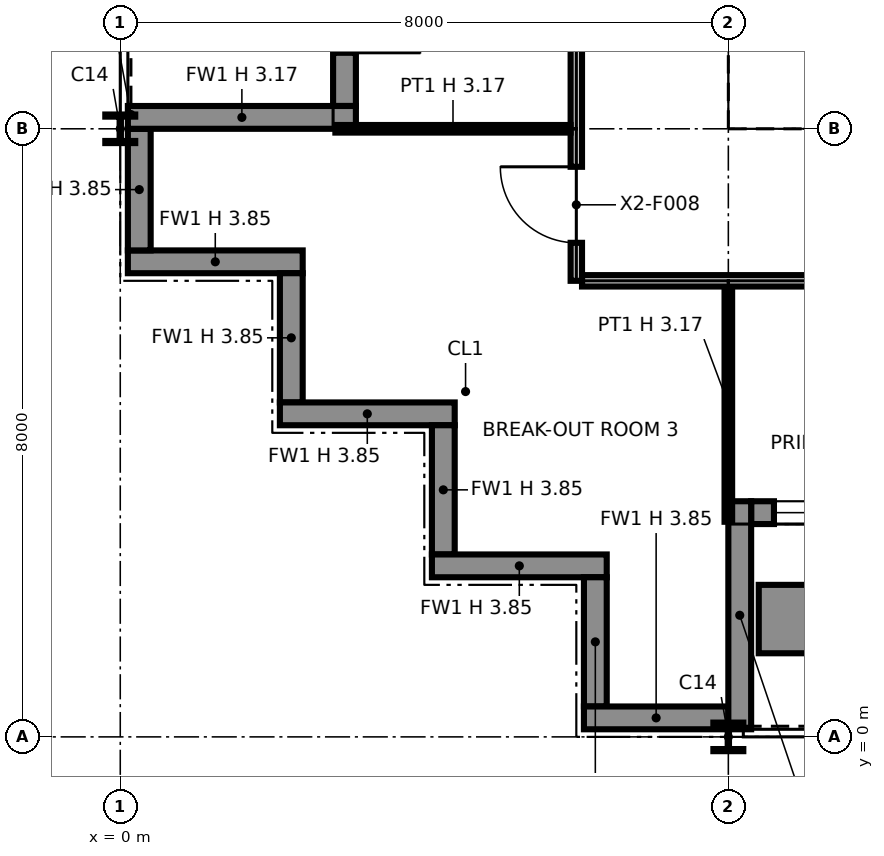
"""IFC4 building model, lengths in metres.
Left out: names, types, materials, properties, quantities, classifications, styles, units other than length and angle.
Written with IfcOpenShell. Run it as: python <this file> out.ifc"""

import sys

from ifc_helpers import new_model, si_unit, direction, frame, frame_2d, origin, origin_2d, place, context, subcontext, project, spatial, polyline, rectangle, i_section, outline, extrude, element, fill, save


model = new_model("IFC4")
c1 = context("Model", 3, precision=1e-05, world=origin(), true_north=direction((0.0, 1.0)))
c2 = subcontext(c1, "Body", "Model", "MODEL_VIEW")
j1 = project(units=[si_unit("LENGTHUNIT", "METRE"), si_unit("PLANEANGLEUNIT", "RADIAN")], contexts=[c1])
p1 = place(None, origin())
s1 = spatial("IfcSite", under=j1, at=p1, CompositionType="ELEMENT")
p2 = place(p1, origin())
s2 = spatial("IfcBuilding", under=s1, at=p2, CompositionType="ELEMENT")
p3 = place(p2, frame((0.0, 0.0, 259.0)))
s3 = spatial("IfcBuildingStorey", under=s2, at=p3, CompositionType="ELEMENT", Elevation=259.0)
for number, where, z_axis, x_axis in (
    (1, (0.0, 8.0, 0.0), (0.0, 0.0, 1.0), (1.0, 0.0, 0.0)),
    (2, (8.0, 0.0, 0.0), (0.0, 0.0, 1.0), (1.0, 0.0, 0.0)),
):
    element("IfcColumn", number, at=place(p3, frame(where, z_axis=z_axis, x_axis=x_axis)), inside=s3, PredefinedType="COLUMN", context=c2, shape_type="SweptSolid", body=[
        extrude(i_section(OverallWidth=0.394, OverallDepth=0.376, WebThickness=0.017, FlangeThickness=0.028, at=origin_2d()), origin(), (0.0, 0.0, 1.0), 3.85),
    ])
p4 = place(p3, frame((8.0, 8.0, 0.0), z_axis=(0.0, 0.0, 1.0), x_axis=(1.0, 0.0, 0.0)))
e3 = element("IfcColumn", 3, at=p4, inside=s3, PredefinedType="COLUMN", context=c2, shape_type="SweptSolid", body=[
    extrude(i_section(OverallWidth=0.371, OverallDepth=0.361, WebThickness=0.012, FlangeThickness=0.02, at=origin_2d()), origin(), (0.0, 0.0, 1.0), 3.85),
])
p5 = place(p3, frame((0.1, 6.25, 0.0), z_axis=(0.0, 0.0, 1.0), x_axis=(1.0, 0.0, 0.0)))
e4 = element("IfcWall", 4, at=p5, inside=s3, PredefinedType="SOLIDWALL", context=c2, shape_type="SweptSolid", body=[
    extrude(rectangle(XDim=2.3, YDim=0.3, at=frame_2d((1.15, 0.0))), origin(), (0.0, 0.0, 1.0), 3.85),
])
p6 = place(p3, frame((2.25, 6.1, 0.0), z_axis=(0.0, 0.0, 1.0), x_axis=(0.0, -1.0, 0.0)))
e5 = element("IfcWall", 5, at=p6, inside=s3, PredefinedType="SOLIDWALL", context=c2, shape_type="SweptSolid", body=[
    extrude(rectangle(XDim=1.7, YDim=0.3, at=frame_2d((0.85, 0.0))), origin(), (0.0, 0.0, 1.0), 3.85),
])
p7 = place(p3, frame((2.1, 4.25, 0.0), z_axis=(0.0, 0.0, 1.0), x_axis=(1.0, 0.0, 0.0)))
e6 = element("IfcWall", 6, at=p7, inside=s3, PredefinedType="SOLIDWALL", context=c2, shape_type="SweptSolid", body=[
    extrude(rectangle(XDim=2.3, YDim=0.3, at=frame_2d((1.15, 0.0))), origin(), (0.0, 0.0, 1.0), 3.85),
])
p8 = place(p3, frame((4.25, 4.1, 0.0), z_axis=(0.0, 0.0, 1.0), x_axis=(0.0, -1.0, 0.0)))
e7 = element("IfcWall", 7, at=p8, inside=s3, PredefinedType="SOLIDWALL", context=c2, shape_type="SweptSolid", body=[
    extrude(rectangle(XDim=1.7, YDim=0.3, at=frame_2d((0.85, 0.0))), origin(), (0.0, 0.0, 1.0), 3.85),
])
p9 = place(p3, frame((4.1, 2.25, 0.0), z_axis=(0.0, 0.0, 1.0), x_axis=(1.0, 0.0, 0.0)))
e8 = element("IfcWall", 8, at=p9, inside=s3, PredefinedType="SOLIDWALL", context=c2, shape_type="SweptSolid", body=[
    extrude(rectangle(XDim=2.3, YDim=0.3, at=frame_2d((1.15, 0.0))), origin(), (0.0, 0.0, 1.0), 3.85),
])
p10 = place(p3, frame((6.25, 2.1, 0.0), z_axis=(0.0, 0.0, 1.0), x_axis=(0.0, -1.0, 0.0)))
e9 = element("IfcWall", 9, at=p10, inside=s3, PredefinedType="SOLIDWALL", context=c2, shape_type="SweptSolid", body=[
    extrude(rectangle(XDim=1.7, YDim=0.3, at=frame_2d((0.85, 0.0))), origin(), (0.0, 0.0, 1.0), 3.85),
])
p11 = place(p3, frame((6.1, 0.25, 0.0), z_axis=(0.0, 0.0, 1.0), x_axis=(1.0, 0.0, 0.0)))
e10 = element("IfcWall", 10, at=p11, inside=s3, PredefinedType="SOLIDWALL", context=c2, shape_type="SweptSolid", body=[
    extrude(rectangle(XDim=1.9, YDim=0.3, at=frame_2d((0.95, 0.0))), origin(), (0.0, 0.0, 1.0), 3.85),
])
p12 = place(p3, frame((8.3, 2.95, 0.0), z_axis=(0.0, 0.0, 1.0), x_axis=(1.0, 0.0, 0.0)))
e11 = element("IfcWall", 11, at=p12, inside=s3, PredefinedType="SOLIDWALL", context=c2, shape_type="SweptSolid", body=[
    extrude(rectangle(XDim=7.4, YDim=0.3, at=frame_2d((3.7, 0.0))), origin(), (0.0, 0.0, 1.0), 3.85),
])
p13 = place(p12, frame((0.3, 0.0, 0.9)))
e12 = element("IfcOpeningElement", 12, at=p13, cuts=e11, PredefinedType="OPENING", context=c2, shape_type="SweptSolid", body=[
    extrude(rectangle(XDim=2.8, YDim=2.2, at=frame_2d((1.4, 1.1))), frame((0.0, 0.16, 0.0), z_axis=(0.0, -1.0, 0.0), x_axis=(1.0, 0.0, 0.0)), (0.0, 0.0, 1.0), 0.32),
])
p14 = place(p12, frame((4.7, 0.0, 0.0)))
e13 = element("IfcOpeningElement", 13, at=p14, cuts=e11, PredefinedType="OPENING", context=c2, shape_type="SweptSolid", body=[
    extrude(rectangle(XDim=2.0, YDim=2.4, at=frame_2d((1.0, 1.2))), frame((0.0, 0.16, 0.0), z_axis=(0.0, -1.0, 0.0), x_axis=(1.0, 0.0, 0.0)), (0.0, 0.0, 1.0), 0.32),
])
p15 = place(p3, frame((8.15, 0.1, 0.0), z_axis=(0.0, 0.0, 1.0), x_axis=(0.0, 1.0, 0.0)))
e14 = element("IfcWall", 14, at=p15, inside=s3, PredefinedType="SOLIDWALL", context=c2, shape_type="SweptSolid", body=[
    extrude(rectangle(XDim=3.0, YDim=0.3, at=frame_2d((1.5, 0.0))), origin(), (0.0, 0.0, 1.0), 3.171),
])
p16 = place(p3, frame((8.4, 1.55, 0.0), z_axis=(0.0, 0.0, 1.0), x_axis=(1.0, 0.0, 0.0)))
e15 = element("IfcWall", 15, at=p16, inside=s3, PredefinedType="SOLIDWALL", context=c2, shape_type="SweptSolid", body=[
    extrude(rectangle(XDim=3.2, YDim=0.9, at=frame_2d((1.6, 0.0))), origin(), (0.0, 0.0, 1.0), 0.6),
])
p17 = place(p3, frame((2.95, 15.7, 0.0), z_axis=(0.0, 0.0, 1.0), x_axis=(0.0, -1.0, 0.0)))
e16 = element("IfcWall", 16, at=p17, inside=s3, PredefinedType="SOLIDWALL", context=c2, shape_type="SweptSolid", body=[
    extrude(rectangle(XDim=7.4, YDim=0.3, at=frame_2d((3.7, 0.0))), origin(), (0.0, 0.0, 1.0), 3.85),
])
p18 = place(p17, frame((0.3, 0.0, 0.9)))
e17 = element("IfcOpeningElement", 17, at=p18, cuts=e16, PredefinedType="OPENING", context=c2, shape_type="SweptSolid", body=[
    extrude(rectangle(XDim=2.8, YDim=2.2, at=frame_2d((1.4, 1.1))), frame((0.0, 0.16, 0.0), z_axis=(0.0, -1.0, 0.0), x_axis=(1.0, 0.0, 0.0)), (0.0, 0.0, 1.0), 0.32),
])
p19 = place(p17, frame((4.7, 0.0, 0.0)))
e18 = element("IfcOpeningElement", 18, at=p19, cuts=e16, PredefinedType="OPENING", context=c2, shape_type="SweptSolid", body=[
    extrude(rectangle(XDim=2.0, YDim=2.4, at=frame_2d((1.0, 1.2))), frame((0.0, 0.16, 0.0), z_axis=(0.0, -1.0, 0.0), x_axis=(1.0, 0.0, 0.0)), (0.0, 0.0, 1.0), 0.32),
])
p20 = place(p3, frame((0.1, 8.15, 0.0), z_axis=(0.0, 0.0, 1.0), x_axis=(1.0, 0.0, 0.0)))
e19 = element("IfcWall", 19, at=p20, inside=s3, PredefinedType="SOLIDWALL", context=c2, shape_type="SweptSolid", body=[
    extrude(rectangle(XDim=3.0, YDim=0.3, at=frame_2d((1.5, 0.0))), origin(), (0.0, 0.0, 1.0), 3.171),
])
p21 = place(p3, frame((0.25, 8.0, 0.0), z_axis=(0.0, 0.0, 1.0), x_axis=(0.0, -1.0, 0.0)))
e20 = element("IfcWall", 20, at=p21, inside=s3, PredefinedType="SOLIDWALL", context=c2, shape_type="SweptSolid", body=[
    extrude(rectangle(XDim=1.6, YDim=0.3, at=frame_2d((0.8, 0.0))), origin(), (0.0, 0.0, 1.0), 3.85),
])
p22 = place(p3, frame((8.65, 8.75, 0.0), z_axis=(0.0, 0.0, 1.0), x_axis=(1.0, 0.0, 0.0)))
e21 = element("IfcWall", 21, at=p22, inside=s3, PredefinedType="PARTITIONING", context=c2, shape_type="SweptSolid", body=[
    extrude(outline(polyline([(0.0, 0.0), (14.7, 0.0), (14.7, 3.85), (7.438, 3.85), (7.438, 3.308), (7.262, 3.308), (7.261, 3.85), (0.0, 3.85), (0.0, 0.0)])), frame((0.0, 0.1, 0.0), z_axis=(0.0, -1.0, 0.0), x_axis=(1.0, 0.0, 0.0)), (0.0, 0.0, 1.0), 0.2),
])
p23 = place(p22, frame((1.3, 0.0, 0.0)))
e22 = element("IfcOpeningElement", 22, at=p23, cuts=e21, PredefinedType="OPENING", context=c2, shape_type="SweptSolid", body=[
    extrude(rectangle(XDim=1.4, YDim=2.1, at=frame_2d((0.7, 1.05))), frame((0.0, 0.11, 0.0), z_axis=(0.0, -1.0, 0.0), x_axis=(1.0, 0.0, 0.0)), (0.0, 0.0, 1.0), 0.22),
])
p24 = place(p22, frame((4.6, 0.0, 0.0)))
e23 = element("IfcOpeningElement", 23, at=p24, cuts=e21, PredefinedType="OPENING", context=c2, shape_type="SweptSolid", body=[
    extrude(rectangle(XDim=1.4, YDim=2.1, at=frame_2d((0.7, 1.05))), frame((0.0, 0.11, 0.0), z_axis=(0.0, -1.0, 0.0), x_axis=(1.0, 0.0, 0.0)), (0.0, 0.0, 1.0), 0.22),
])
p25 = place(p22, frame((10.4, 0.0, 0.0)))
e24 = element("IfcOpeningElement", 24, at=p25, cuts=e21, PredefinedType="OPENING", context=c2, shape_type="SweptSolid", body=[
    extrude(rectangle(XDim=1.2, YDim=2.1, at=frame_2d((0.6, 1.05))), frame((0.0, 0.11, 0.0), z_axis=(0.0, -1.0, 0.0), x_axis=(1.0, 0.0, 0.0)), (0.0, 0.0, 1.0), 0.22),
])
p26 = place(p3, frame((8.75, 8.85, 0.0), z_axis=(0.0, 0.0, 1.0), x_axis=(0.0, 1.0, 0.0)))
e25 = element("IfcWall", 25, at=p26, inside=s3, PredefinedType="PARTITIONING", context=c2, shape_type="SweptSolid", body=[
    extrude(outline(polyline([(0.0, 0.0), (14.3, 0.0), (14.3, 3.85), (10.225, 3.85), (10.224, 3.44), (10.076, 3.44), (10.075, 3.85), (7.239, 3.85), (7.238, 3.308), (7.062, 3.308), (7.062, 3.85), (0.0, 3.85), (0.0, 0.0)])), frame((0.0, 0.1, 0.0), z_axis=(0.0, -1.0, 0.0), x_axis=(1.0, 0.0, 0.0)), (0.0, 0.0, 1.0), 0.2),
])
p27 = place(p26, frame((8.3, 0.0, 0.0)))
e26 = element("IfcOpeningElement", 26, at=p27, cuts=e25, PredefinedType="OPENING", context=c2, shape_type="SweptSolid", body=[
    extrude(rectangle(XDim=1.8, YDim=2.1, at=frame_2d((0.9, 1.05))), frame((0.0, 0.11, 0.0), z_axis=(0.0, -1.0, 0.0), x_axis=(1.0, 0.0, 0.0)), (0.0, 0.0, 1.0), 0.22),
])
p28 = place(p3, frame((8.0, 2.83, 0.0), z_axis=(0.0, 0.0, 1.0), x_axis=(0.0, 1.0, 0.0)))
e27 = element("IfcWall", 27, at=p28, inside=s3, PredefinedType="PARTITIONING", context=c2, shape_type="SweptSolid", body=[
    extrude(rectangle(XDim=3.095, YDim=0.1, at=frame_2d((1.547, 0.0))), origin(), (0.0, 0.0, 1.0), 3.172),
])
p29 = place(p3, frame((6.075, 6.0, 0.0), z_axis=(0.0, 0.0, 1.0), x_axis=(1.0, 0.0, 0.0)))
e28 = element("IfcWall", 28, at=p29, inside=s3, PredefinedType="PARTITIONING", context=c2, shape_type="SweptSolid", body=[
    extrude(rectangle(XDim=35.85, YDim=0.15, at=frame_2d((17.925, 0.0))), origin(), (0.0, 0.0, 1.0), 3.85),
])
p30 = place(p29, frame((14.425, 0.0, 0.0), z_axis=(0.0, 0.0, 1.0), x_axis=(-1.0, 0.0, 0.0)))
e29 = element("IfcOpeningElement", 29, at=p30, cuts=e28, PredefinedType="OPENING", context=c2, shape_type="SweptSolid", body=[
    extrude(rectangle(XDim=1.0, YDim=2.1, at=frame_2d((0.5, 1.05))), frame((0.0, 0.085, 0.0), z_axis=(0.0, -1.0, 0.0), x_axis=(1.0, 0.0, 0.0)), (0.0, 0.0, 1.0), 0.17),
])
p31 = place(p29, frame((30.425, 0.0, 0.0), z_axis=(0.0, 0.0, 1.0), x_axis=(-1.0, 0.0, 0.0)))
e30 = element("IfcOpeningElement", 30, at=p31, cuts=e28, PredefinedType="OPENING", context=c2, shape_type="SweptSolid", body=[
    extrude(rectangle(XDim=1.0, YDim=2.1, at=frame_2d((0.5, 1.05))), frame((0.0, 0.085, 0.0), z_axis=(0.0, -1.0, 0.0), x_axis=(1.0, 0.0, 0.0)), (0.0, 0.0, 1.0), 0.17),
])
p32 = place(p29, frame((4.425, 0.0, 0.0), z_axis=(0.0, 0.0, 1.0), x_axis=(-1.0, 0.0, 0.0)))
e31 = element("IfcOpeningElement", 31, at=p32, cuts=e28, PredefinedType="OPENING", context=c2, shape_type="SweptSolid", body=[
    extrude(rectangle(XDim=1.0, YDim=2.1, at=frame_2d((0.5, 1.05))), frame((0.0, 0.085, 0.0), z_axis=(0.0, -1.0, 0.0), x_axis=(1.0, 0.0, 0.0)), (0.0, 0.0, 1.0), 0.17),
])
p33 = place(p29, frame((8.425, 0.0, 0.0), z_axis=(0.0, 0.0, 1.0), x_axis=(-1.0, 0.0, 0.0)))
e32 = element("IfcOpeningElement", 32, at=p33, cuts=e28, PredefinedType="OPENING", context=c2, shape_type="SweptSolid", body=[
    extrude(rectangle(XDim=1.0, YDim=2.1, at=frame_2d((0.5, 1.05))), frame((0.0, 0.085, 0.0), z_axis=(0.0, -1.0, 0.0), x_axis=(1.0, 0.0, 0.0)), (0.0, 0.0, 1.0), 0.17),
])
p34 = place(p29, frame((23.425, 0.0, 0.0), z_axis=(0.0, 0.0, 1.0), x_axis=(-1.0, 0.0, 0.0)))
e33 = element("IfcOpeningElement", 33, at=p34, cuts=e28, PredefinedType="OPENING", context=c2, shape_type="SweptSolid", body=[
    extrude(rectangle(XDim=1.0, YDim=2.1, at=frame_2d((0.5, 1.05))), frame((0.0, 0.085, 0.0), z_axis=(0.0, -1.0, 0.0), x_axis=(1.0, 0.0, 0.0)), (0.0, 0.0, 1.0), 0.17),
])
p35 = place(p29, frame((35.425, 0.0, 0.0), z_axis=(0.0, 0.0, 1.0), x_axis=(-1.0, 0.0, 0.0)))
e34 = element("IfcOpeningElement", 34, at=p35, cuts=e28, PredefinedType="OPENING", context=c2, shape_type="SweptSolid", body=[
    extrude(rectangle(XDim=1.0, YDim=2.1, at=frame_2d((0.5, 1.05))), frame((0.0, 0.085, 0.0), z_axis=(0.0, -1.0, 0.0), x_axis=(1.0, 0.0, 0.0)), (0.0, 0.0, 1.0), 0.17),
])
p36 = place(p3, frame((6.0, 6.0, 0.0), z_axis=(0.0, 0.0, 1.0), x_axis=(0.0, 1.0, 0.0)))
e35 = element("IfcWall", 35, at=p36, inside=s3, PredefinedType="PARTITIONING", context=c2, shape_type="SweptSolid", body=[
    extrude(outline(polyline([(0.0, 0.0), (13.375, 0.0), (13.375, 3.85), (10.3, 3.85), (10.298, 3.172), (9.702, 3.172), (9.7, 3.85), (6.3, 3.85), (6.298, 3.172), (5.702, 3.172), (5.7, 3.85), (2.3, 3.85), (2.298, 3.172), (1.702, 3.172), (1.7, 3.85), (0.0, 3.85), (0.0, 0.0)])), frame((0.0, 0.075, 0.0), z_axis=(0.0, -1.0, 0.0), x_axis=(1.0, 0.0, 0.0)), (0.0, 0.0, 1.0), 0.15),
])
p37 = place(p36, frame((0.5, 0.0, 0.0)))
e36 = element("IfcOpeningElement", 36, at=p37, cuts=e35, PredefinedType="OPENING", context=c2, shape_type="SweptSolid", body=[
    extrude(rectangle(XDim=1.0, YDim=2.1, at=frame_2d((0.5, 1.05))), frame((0.0, 0.085, 0.0), z_axis=(0.0, -1.0, 0.0), x_axis=(1.0, 0.0, 0.0)), (0.0, 0.0, 1.0), 0.17),
])
p38 = place(p36, frame((5.5, 0.0, 0.0)))
e37 = element("IfcOpeningElement", 37, at=p38, cuts=e35, PredefinedType="OPENING", context=c2, shape_type="SweptSolid", body=[
    extrude(rectangle(XDim=1.0, YDim=2.1, at=frame_2d((0.5, 1.05))), frame((0.0, 0.085, 0.0), z_axis=(0.0, -1.0, 0.0), x_axis=(1.0, 0.0, 0.0)), (0.0, 0.0, 1.0), 0.17),
])
p39 = place(p36, frame((11.225, 0.0, 0.0)))
e38 = element("IfcOpeningElement", 38, at=p39, cuts=e35, PredefinedType="OPENING", context=c2, shape_type="SweptSolid", body=[
    extrude(rectangle(XDim=1.0, YDim=2.1, at=frame_2d((0.5, 1.05))), frame((0.0, 0.085, 0.0), z_axis=(0.0, -1.0, 0.0), x_axis=(1.0, 0.0, 0.0)), (0.0, 0.0, 1.0), 0.17),
])
p40 = place(p3, frame((2.83, 8.0, 0.0), z_axis=(0.0, 0.0, 1.0), x_axis=(1.0, 0.0, 0.0)))
e39 = element("IfcWall", 39, at=p40, inside=s3, PredefinedType="PARTITIONING", context=c2, shape_type="SweptSolid", body=[
    extrude(rectangle(XDim=3.095, YDim=0.1, at=frame_2d((1.547, 0.0))), origin(), (0.0, 0.0, 1.0), 3.172),
])
p41 = place(p13, origin())
e40 = element("IfcWindow", 40, at=p41, inside=s3, PartitioningType="SINGLE_PANEL", PredefinedType="WINDOW", context=c2, shape_type="SweptSolid", body=[
    extrude(rectangle(XDim=2.8, YDim=2.2, at=frame_2d((1.4, 1.1))), frame((0.0, 0.03, 0.0), z_axis=(0.0, -1.0, 0.0), x_axis=(1.0, 0.0, 0.0)), (0.0, 0.0, 1.0), 0.06),
])
fill(e12, e40)
p42 = place(p37, origin())
e41 = element("IfcDoor", 41, at=p42, inside=s3, OperationType="SINGLE_SWING_RIGHT", PredefinedType="DOOR", context=c2, shape_type="SweptSolid", body=[
    extrude(rectangle(XDim=1.0, YDim=2.1, at=frame_2d((0.5, 1.05))), frame((0.0, 0.025, 0.0), z_axis=(0.0, -1.0, 0.0), x_axis=(1.0, 0.0, 0.0)), (0.0, 0.0, 1.0), 0.05),
])
fill(e36, e41)
save(model, sys.argv[1])
